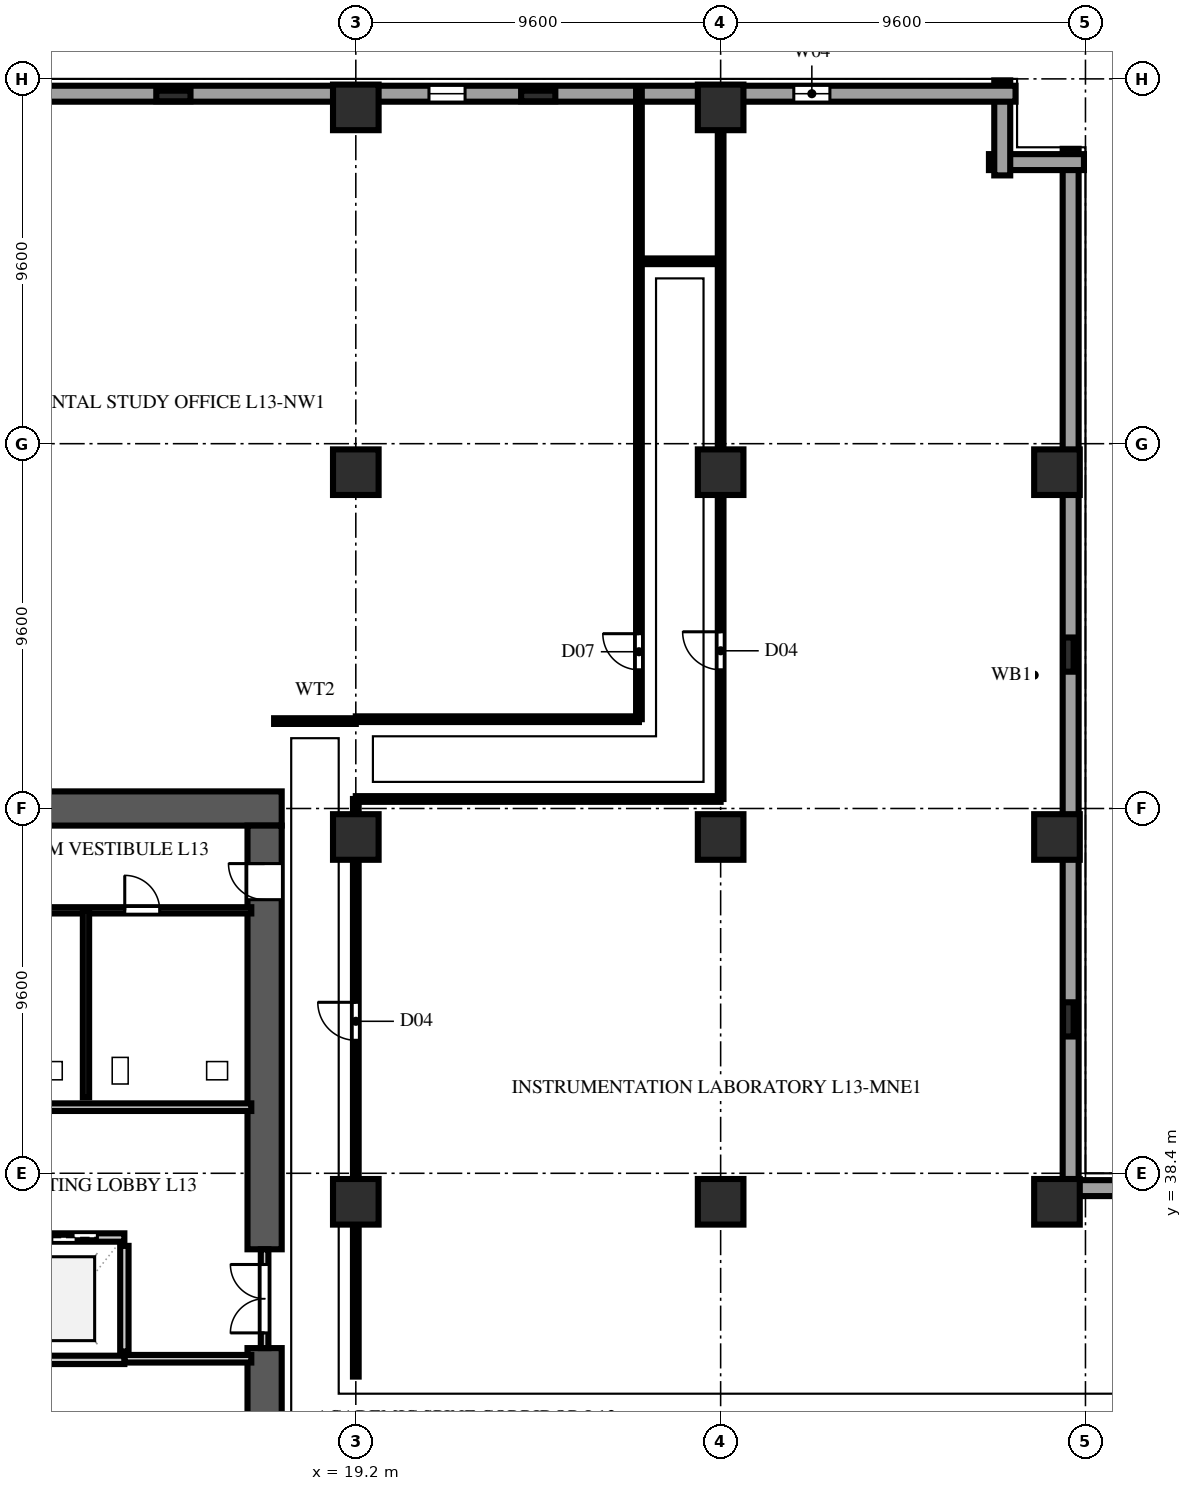
"""IFC4 building model, lengths in metres.
Left out: names, types, materials, properties, quantities, classifications, styles, units other than length and angle.
Written with IfcOpenShell. Run it as: python <this file> out.ifc"""

import sys

from ifc_helpers import new_model, si_unit, direction, frame, frame_2d, origin, origin_2d, place, context, subcontext, project, spatial, rectangle, extrude, element, fill, save


model = new_model("IFC4")
c1 = context("Model", 3, precision=1e-05, world=origin(), true_north=direction((0.0, 1.0)))
c2 = subcontext(c1, "Body", "Model", "MODEL_VIEW")
j1 = project(units=[si_unit("LENGTHUNIT", "METRE"), si_unit("PLANEANGLEUNIT", "RADIAN")], contexts=[c1])
p1 = place(None, origin())
s1 = spatial("IfcSite", under=j1, at=p1, CompositionType="ELEMENT")
p2 = place(p1, origin())
s2 = spatial("IfcBuilding", under=s1, at=p2, CompositionType="ELEMENT")
p3 = place(p2, frame((0.0, 0.0, 54.6)))
s3 = spatial("IfcBuildingStorey", under=s2, at=p3, CompositionType="ELEMENT", Elevation=54.6)
p4 = place(p3, frame((2.65, 48.0, 0.0), z_axis=(0.0, 0.0, 1.0), x_axis=(1.0, 0.0, 0.0)))
e1 = element("IfcWall", 1, at=p4, inside=s3, PredefinedType="SHEAR", context=c2, shape_type="SweptSolid", body=[
    extrude(rectangle(XDim=14.6, YDim=0.9, at=frame_2d((7.3, 0.0))), origin(), (0.0, 0.0, 1.0), 3.54),
])
p5 = place(p3, frame((16.8, 26.0, 0.0), z_axis=(0.0, 0.0, 1.0), x_axis=(0.0, 1.0, 0.0)))
e2 = element("IfcWall", 2, at=p5, inside=s3, PredefinedType="SHEAR", context=c2, shape_type="SweptSolid", body=[
    extrude(rectangle(XDim=7.8, YDim=0.9, at=frame_2d((3.9, 0.0))), origin(), (0.0, 0.0, 1.0), 3.54),
])
p6 = place(p3, frame((16.8, 36.4, 0.0), z_axis=(0.0, 0.0, 1.0), x_axis=(0.0, 1.0, 0.0)))
e3 = element("IfcWall", 3, at=p6, inside=s3, PredefinedType="SHEAR", context=c2, shape_type="SweptSolid", body=[
    extrude(rectangle(XDim=11.15, YDim=0.9, at=frame_2d((5.575, 0.0))), origin(), (0.0, 0.0, 1.0), 3.54),
])
p7 = place(p6, frame((9.2, 0.0, 0.0)))
e4 = element("IfcOpeningElement", 4, at=p7, cuts=e3, PredefinedType="OPENING", context=c2, shape_type="SweptSolid", body=[
    extrude(rectangle(XDim=0.95, YDim=2.15, at=frame_2d((0.475, 1.075))), frame((0.0, 0.462, 0.0), z_axis=(0.0, -1.0, 0.0), x_axis=(1.0, 0.0, 0.0)), (0.0, 0.0, 1.0), 0.924),
])
for number, where, z_axis, x_axis in (
    (5, (19.2, 37.65, 0.0), (0.0, 0.0, 1.0), (1.0, 0.0, 0.0)),
    (6, (19.2, 47.25, 0.0), (0.0, 0.0, 1.0), (1.0, 0.0, 0.0)),
    (7, (19.2, 56.85, 0.0), (0.0, 0.0, 1.0), (1.0, 0.0, 0.0)),
    (8, (19.2, 66.45, 0.0), (0.0, 0.0, 1.0), (1.0, 0.0, 0.0)),
    (9, (28.8, 37.65, 0.0), (0.0, 0.0, 1.0), (1.0, 0.0, 0.0)),
    (10, (28.8, 47.25, 0.0), (0.0, 0.0, 1.0), (1.0, 0.0, 0.0)),
    (11, (28.8, 56.85, 0.0), (0.0, 0.0, 1.0), (1.0, 0.0, 0.0)),
    (12, (28.8, 66.45, 0.0), (0.0, 0.0, 1.0), (1.0, 0.0, 0.0)),
    (13, (37.65, 37.65, 0.0), (0.0, 0.0, 1.0), (1.0, 0.0, 0.0)),
    (14, (37.65, 47.25, 0.0), (0.0, 0.0, 1.0), (1.0, 0.0, 0.0)),
    (15, (37.65, 56.85, 0.0), (0.0, 0.0, 1.0), (1.0, 0.0, 0.0)),
):
    element("IfcColumn", number, at=place(p3, frame(where, z_axis=z_axis, x_axis=x_axis)), inside=s3, PredefinedType="COLUMN", context=c2, shape_type="SweptSolid", body=[
        extrude(rectangle(XDim=1.2, YDim=1.2, at=origin_2d()), origin(), (0.0, 0.0, 1.0), 3.8),
    ])
for number, where, z_axis, x_axis in (
    (16, (14.4, 66.75, 0.0), (0.0, 0.0, 1.0), (1.0, 0.0, 0.0)),
    (17, (24.0, 66.75, 0.0), (0.0, 0.0, 1.0), (1.0, 0.0, 0.0)),
    (18, (37.95, 42.45, 0.0), (0.0, 0.0, 1.0), (0.0, 1.0, 0.0)),
    (19, (37.95, 52.05, 0.0), (0.0, 0.0, 1.0), (0.0, 1.0, 0.0)),
):
    element("IfcColumn", number, at=place(p3, frame(where, z_axis=z_axis, x_axis=x_axis)), inside=s3, PredefinedType="PILASTER", context=c2, shape_type="SweptSolid", body=[
        extrude(rectangle(XDim=0.9, YDim=0.28, at=origin_2d()), origin(), (0.0, 0.0, 1.0), 3.8),
    ])
for number, where, z_axis, x_axis in (
    (20, (65.36, 38.01, 0.0), (0.0, 0.0, 1.0), (-1.0, 0.0, 0.0)),
    (21, (38.01, 37.66, 0.0), (0.0, 0.0, 1.0), (0.0, 1.0, 0.0)),
):
    element("IfcWall", number, at=place(p3, frame(where, z_axis=z_axis, x_axis=x_axis)), inside=s3, PredefinedType="SOLIDWALL", context=c2, shape_type="SweptSolid", body=[
        extrude(rectangle(XDim=27.7, YDim=0.42, at=frame_2d((13.85, 0.0))), origin(), (0.0, 0.0, 1.0), 3.54),
    ])
for number, where, z_axis, x_axis in (
    (22, (38.36, 65.01, 0.0), (0.0, 0.0, 1.0), (-1.0, 0.0, 0.0)),
    (23, (36.21, 64.66, 0.0), (0.0, 0.0, 1.0), (0.0, 1.0, 0.0)),
):
    element("IfcWall", number, at=place(p3, frame(where, z_axis=z_axis, x_axis=x_axis)), inside=s3, PredefinedType="SOLIDWALL", context=c2, shape_type="SweptSolid", body=[
        extrude(rectangle(XDim=2.5, YDim=0.42, at=frame_2d((1.25, 0.0))), origin(), (0.0, 0.0, 1.0), 3.54),
    ])
p8 = place(p3, frame((36.56, 66.81, 0.0), z_axis=(0.0, 0.0, 1.0), x_axis=(-1.0, 0.0, 0.0)))
e24 = element("IfcWall", 24, at=p8, inside=s3, PredefinedType="SOLIDWALL", context=c2, shape_type="SweptSolid", body=[
    extrude(rectangle(XDim=34.72, YDim=0.42, at=frame_2d((17.36, 0.0))), origin(), (0.0, 0.0, 1.0), 3.54),
])
p9 = place(p8, frame((4.885, 0.0, 0.9)))
e25 = element("IfcOpeningElement", 25, at=p9, cuts=e24, PredefinedType="OPENING", context=c2, shape_type="SweptSolid", body=[
    extrude(rectangle(XDim=0.95, YDim=1.85, at=frame_2d((0.475, 0.925))), frame((0.0, 0.222, 0.0), z_axis=(0.0, -1.0, 0.0), x_axis=(1.0, 0.0, 0.0)), (0.0, 0.0, 1.0), 0.444),
])
p10 = place(p8, frame((14.485, 0.0, 0.9)))
e26 = element("IfcOpeningElement", 26, at=p10, cuts=e24, PredefinedType="OPENING", context=c2, shape_type="SweptSolid", body=[
    extrude(rectangle(XDim=0.95, YDim=1.85, at=frame_2d((0.475, 0.925))), frame((0.0, 0.222, 0.0), z_axis=(0.0, -1.0, 0.0), x_axis=(1.0, 0.0, 0.0)), (0.0, 0.0, 1.0), 0.444),
])
p11 = place(p3, frame((13.11, 33.71, 0.0), z_axis=(0.0, 0.0, 1.0), x_axis=(0.0, 1.0, 0.0)))
e27 = element("IfcWall", 27, at=p11, inside=s3, PredefinedType="SOLIDWALL", context=c2, shape_type="SweptSolid", body=[
    extrude(rectangle(XDim=2.78, YDim=0.22, at=frame_2d((1.39, 0.0))), origin(), (0.0, 0.0, 1.0), 3.54),
])
p12 = place(p3, frame((10.49, 33.49, 0.0), z_axis=(0.0, 0.0, 1.0), x_axis=(1.0, 0.0, 0.0)))
e28 = element("IfcWall", 28, at=p12, inside=s3, PredefinedType="SOLIDWALL", context=c2, shape_type="SweptSolid", body=[
    extrude(rectangle(XDim=2.62, YDim=0.22, at=frame_2d((1.31, 0.0))), origin(), (0.0, 0.0, 1.0), 3.54),
])
p13 = place(p3, frame((10.49, 36.71, 0.0), z_axis=(0.0, 0.0, 1.0), x_axis=(1.0, 0.0, 0.0)))
e29 = element("IfcWall", 29, at=p13, inside=s3, PredefinedType="SOLIDWALL", context=c2, shape_type="SweptSolid", body=[
    extrude(rectangle(XDim=2.62, YDim=0.22, at=frame_2d((1.31, 0.0))), origin(), (0.0, 0.0, 1.0), 3.54),
])
p14 = place(p13, frame((0.71, 0.0, 0.0)))
e30 = element("IfcOpeningElement", 30, at=p14, cuts=e29, PredefinedType="OPENING", context=c2, shape_type="SweptSolid", body=[
    extrude(rectangle(XDim=1.2, YDim=2.2, at=frame_2d((0.6, 1.1))), frame((0.0, 0.122, 0.0), z_axis=(0.0, -1.0, 0.0), x_axis=(1.0, 0.0, 0.0)), (0.0, 0.0, 1.0), 0.244),
])
p15 = place(p3, frame((13.12, 33.52, 0.0), z_axis=(0.0, 0.0, 1.0), x_axis=(1.0, 0.0, 0.0)))
e31 = element("IfcWall", 31, at=p15, inside=s3, PredefinedType="SOLIDWALL", context=c2, shape_type="SweptSolid", body=[
    extrude(rectangle(XDim=3.33, YDim=0.2, at=frame_2d((1.665, 0.0))), origin(), (0.0, 0.0, 1.0), 3.54),
])
p16 = place(p3, frame((6.32, 40.14, 0.0), z_axis=(0.0, 0.0, 1.0), x_axis=(1.0, 0.0, 0.0)))
e32 = element("IfcWall", 32, at=p16, inside=s3, PredefinedType="SOLIDWALL", context=c2, shape_type="SweptSolid", body=[
    extrude(rectangle(XDim=10.13, YDim=0.2, at=frame_2d((5.065, 0.0))), origin(), (0.0, 0.0, 1.0), 3.54),
])
p17 = place(p3, frame((16.8, 33.8, 0.0), z_axis=(0.0, 0.0, 1.0), x_axis=(0.0, 1.0, 0.0)))
e33 = element("IfcWall", 33, at=p17, inside=s3, PredefinedType="SOLIDWALL", context=c2, shape_type="SweptSolid", body=[
    extrude(rectangle(XDim=2.6, YDim=0.2, at=frame_2d((1.3, 0.0))), origin(), (0.0, 0.0, 1.0), 3.54),
])
p18 = place(p17, frame((0.4, 0.0, 0.0)))
e34 = element("IfcOpeningElement", 34, at=p18, cuts=e33, PredefinedType="OPENING", context=c2, shape_type="SweptSolid", body=[
    extrude(rectangle(XDim=1.8, YDim=2.2, at=frame_2d((0.9, 1.1))), frame((0.0, 0.112, 0.0), z_axis=(0.0, -1.0, 0.0), x_axis=(1.0, 0.0, 0.0)), (0.0, 0.0, 1.0), 0.224),
])
p19 = place(p3, frame((6.32, 45.32, 0.0), z_axis=(0.0, 0.0, 1.0), x_axis=(1.0, 0.0, 0.0)))
e35 = element("IfcWall", 35, at=p19, inside=s3, PredefinedType="PLUMBINGWALL", context=c2, shape_type="SweptSolid", body=[
    extrude(rectangle(XDim=10.13, YDim=0.165, at=frame_2d((5.065, 0.0))), origin(), (0.0, 0.0, 1.0), 3.54),
])
p20 = place(p19, frame((0.55, 0.0, 0.0)))
e36 = element("IfcOpeningElement", 36, at=p20, cuts=e35, PredefinedType="OPENING", context=c2, shape_type="SweptSolid", body=[
    extrude(rectangle(XDim=0.85, YDim=2.1, at=frame_2d((0.425, 1.05))), frame((0.0, 0.094, 0.0), z_axis=(0.0, -1.0, 0.0), x_axis=(1.0, 0.0, 0.0)), (0.0, 0.0, 1.0), 0.189),
])
p21 = place(p19, frame((3.1, 0.0, 0.0)))
e37 = element("IfcOpeningElement", 37, at=p21, cuts=e35, PredefinedType="OPENING", context=c2, shape_type="SweptSolid", body=[
    extrude(rectangle(XDim=0.92, YDim=2.15, at=frame_2d((0.46, 1.075))), frame((0.0, 0.094, 0.0), z_axis=(0.0, -1.0, 0.0), x_axis=(1.0, 0.0, 0.0)), (0.0, 0.0, 1.0), 0.189),
])
p22 = place(p19, frame((6.8, 0.0, 0.0)))
e38 = element("IfcOpeningElement", 38, at=p22, cuts=e35, PredefinedType="OPENING", context=c2, shape_type="SweptSolid", body=[
    extrude(rectangle(XDim=0.92, YDim=2.15, at=frame_2d((0.46, 1.075))), frame((0.0, 0.094, 0.0), z_axis=(0.0, -1.0, 0.0), x_axis=(1.0, 0.0, 0.0)), (0.0, 0.0, 1.0), 0.189),
])
p23 = place(p3, frame((12.1, 40.4, 0.0), z_axis=(0.0, 0.0, 1.0), x_axis=(0.0, 1.0, 0.0)))
e39 = element("IfcWall", 39, at=p23, inside=s3, PredefinedType="PLUMBINGWALL", context=c2, shape_type="SweptSolid", body=[
    extrude(rectangle(XDim=4.92, YDim=0.165, at=frame_2d((2.46, 0.0))), origin(), (0.0, 0.0, 1.0), 3.54),
])
p24 = place(p3, frame((17.05, 50.3, 0.0), z_axis=(0.0, 0.0, 1.0), x_axis=(1.0, 0.0, 0.0)))
e40 = element("IfcWall", 40, at=p24, inside=s3, PredefinedType="PARTITIONING", context=c2, shape_type="SweptSolid", body=[
    extrude(rectangle(XDim=2.15, YDim=0.15, at=frame_2d((1.075, 0.0))), origin(), (0.0, 0.0, 1.0), 3.54),
])
p25 = place(p3, frame((19.2, 33.05, 0.0), z_axis=(0.0, 0.0, 1.0), x_axis=(0.0, 1.0, 0.0)))
e41 = element("IfcWall", 41, at=p25, inside=s3, PredefinedType="PARTITIONING", context=c2, shape_type="SweptSolid", body=[
    extrude(rectangle(XDim=15.2, YDim=0.15, at=frame_2d((7.6, 0.0))), origin(), (0.0, 0.0, 1.0), 3.232),
])
p26 = place(p25, frame((8.85, 0.0, 0.0)))
e42 = element("IfcOpeningElement", 42, at=p26, cuts=e41, PredefinedType="OPENING", context=c2, shape_type="SweptSolid", body=[
    extrude(rectangle(XDim=1.0, YDim=2.2, at=frame_2d((0.5, 1.1))), frame((0.0, 0.087, 0.0), z_axis=(0.0, -1.0, 0.0), x_axis=(1.0, 0.0, 0.0)), (0.0, 0.0, 1.0), 0.174),
])
p27 = place(p3, frame((19.2, 48.25, 0.0), z_axis=(0.0, 0.0, 1.0), x_axis=(1.0, 0.0, 0.0)))
e43 = element("IfcWall", 43, at=p27, inside=s3, PredefinedType="PARTITIONING", context=c2, shape_type="SweptSolid", body=[
    extrude(rectangle(XDim=9.6, YDim=0.15, at=frame_2d((4.8, 0.0))), origin(), (0.0, 0.0, 1.0), 3.54),
])
p28 = place(p3, frame((19.2, 50.35, 0.0), z_axis=(0.0, 0.0, 1.0), x_axis=(1.0, 0.0, 0.0)))
e44 = element("IfcWall", 44, at=p28, inside=s3, PredefinedType="PARTITIONING", context=c2, shape_type="SweptSolid", body=[
    extrude(rectangle(XDim=7.45, YDim=0.15, at=frame_2d((3.725, 0.0))), origin(), (0.0, 0.0, 1.0), 3.54),
])
p29 = place(p3, frame((26.65, 62.4, 0.0), z_axis=(0.0, 0.0, 1.0), x_axis=(1.0, 0.0, 0.0)))
e45 = element("IfcWall", 45, at=p29, inside=s3, PredefinedType="PARTITIONING", context=c2, shape_type="SweptSolid", body=[
    extrude(rectangle(XDim=2.15, YDim=0.15, at=frame_2d((1.075, 0.0))), origin(), (0.0, 0.0, 1.0), 3.54),
])
p30 = place(p3, frame((28.8, 48.25, 0.0), z_axis=(0.0, 0.0, 1.0), x_axis=(0.0, 1.0, 0.0)))
e46 = element("IfcWall", 46, at=p30, inside=s3, PredefinedType="PARTITIONING", context=c2, shape_type="SweptSolid", body=[
    extrude(rectangle(XDim=18.2, YDim=0.15, at=frame_2d((9.1, 0.0))), origin(), (0.0, 0.0, 1.0), 3.232),
])
p31 = place(p30, frame((3.4, 0.0, 0.0)))
e47 = element("IfcOpeningElement", 47, at=p31, cuts=e46, PredefinedType="OPENING", context=c2, shape_type="SweptSolid", body=[
    extrude(rectangle(XDim=1.0, YDim=2.2, at=frame_2d((0.5, 1.1))), frame((0.0, 0.087, 0.0), z_axis=(0.0, -1.0, 0.0), x_axis=(1.0, 0.0, 0.0)), (0.0, 0.0, 1.0), 0.174),
])
p32 = place(p3, frame((28.8, 66.45, 0.0), z_axis=(0.0, 0.0, 1.0), x_axis=(0.0, 1.0, 0.0)))
e48 = element("IfcWall", 48, at=p32, inside=s3, PredefinedType="PARTITIONING", context=c2, shape_type="SweptSolid", body=[
    extrude(rectangle(XDim=0.53, YDim=0.15, at=frame_2d((0.265, 0.0))), origin(), (0.0, 0.0, 1.0), 3.54),
])
p33 = place(p3, frame((26.65, 50.35, 0.0), z_axis=(0.0, 0.0, 1.0), x_axis=(0.0, 1.0, 0.0)))
e49 = element("IfcWall", 49, at=p33, inside=s3, PredefinedType="PARTITIONING", context=c2, shape_type="SweptSolid", body=[
    extrude(rectangle(XDim=16.63, YDim=0.15, at=frame_2d((8.315, 0.0))), origin(), (0.0, 0.0, 1.0), 3.54),
])
p34 = place(p33, frame((1.3, 0.0, 0.0)))
e50 = element("IfcOpeningElement", 50, at=p34, cuts=e49, PredefinedType="OPENING", context=c2, shape_type="SweptSolid", body=[
    extrude(rectangle(XDim=0.95, YDim=2.15, at=frame_2d((0.475, 1.075))), frame((0.0, 0.087, 0.0), z_axis=(0.0, -1.0, 0.0), x_axis=(1.0, 0.0, 0.0)), (0.0, 0.0, 1.0), 0.174),
])
p35 = place(p9, origin())
e51 = element("IfcWindow", 51, at=p35, inside=s3, PartitioningType="SINGLE_PANEL", PredefinedType="WINDOW", context=c2, shape_type="SweptSolid", body=[
    extrude(rectangle(XDim=0.95, YDim=1.85, at=frame_2d((0.475, 0.925))), frame((0.0, 0.11, 0.0), z_axis=(0.0, -1.0, 0.0), x_axis=(1.0, 0.0, 0.0)), (0.0, 0.0, 1.0), 0.06),
])
fill(e25, e51)
p36 = place(p10, origin())
e52 = element("IfcWindow", 52, at=p36, inside=s3, PartitioningType="SINGLE_PANEL", PredefinedType="WINDOW", context=c2, shape_type="SweptSolid", body=[
    extrude(rectangle(XDim=0.95, YDim=1.85, at=frame_2d((0.475, 0.925))), frame((0.0, 0.11, 0.0), z_axis=(0.0, -1.0, 0.0), x_axis=(1.0, 0.0, 0.0)), (0.0, 0.0, 1.0), 0.06),
])
fill(e26, e52)
p37 = place(p14, origin())
e53 = element("IfcDoor", 53, at=p37, inside=s3, OperationType="DOUBLE_DOOR_SLIDING", PredefinedType="DOOR", context=c2, shape_type="SweptSolid", body=[
    extrude(rectangle(XDim=1.2, YDim=2.2, at=frame_2d((0.6, 1.1))), frame((0.0, 0.025, 0.0), z_axis=(0.0, -1.0, 0.0), x_axis=(1.0, 0.0, 0.0)), (0.0, 0.0, 1.0), 0.05),
])
fill(e30, e53)
p38 = place(p7, origin())
e54 = element("IfcDoor", 54, at=p38, inside=s3, OperationType="SINGLE_SWING_RIGHT", PredefinedType="DOOR", context=c2, shape_type="SweptSolid", body=[
    extrude(rectangle(XDim=0.95, YDim=2.15, at=frame_2d((0.475, 1.075))), frame((0.0, 0.025, 0.0), z_axis=(0.0, -1.0, 0.0), x_axis=(1.0, 0.0, 0.0)), (0.0, 0.0, 1.0), 0.05),
])
fill(e4, e54)
p39 = place(p18, origin())
e55 = element("IfcDoor", 55, at=p39, inside=s3, OperationType="DOUBLE_DOOR_SINGLE_SWING", PredefinedType="DOOR", context=c2, shape_type="SweptSolid", body=[
    extrude(rectangle(XDim=1.8, YDim=2.2, at=frame_2d((0.9, 1.1))), frame((0.0, 0.025, 0.0), z_axis=(0.0, -1.0, 0.0), x_axis=(1.0, 0.0, 0.0)), (0.0, 0.0, 1.0), 0.05),
])
fill(e34, e55)
p40 = place(p22, origin())
e56 = element("IfcDoor", 56, at=p40, inside=s3, OperationType="SINGLE_SWING_LEFT", PredefinedType="DOOR", context=c2, shape_type="SweptSolid", body=[
    extrude(rectangle(XDim=0.92, YDim=2.15, at=frame_2d((0.46, 1.075))), frame((0.0, 0.025, 0.0), z_axis=(0.0, -1.0, 0.0), x_axis=(1.0, 0.0, 0.0)), (0.0, 0.0, 1.0), 0.05),
])
fill(e38, e56)
p41 = place(p26, origin())
e57 = element("IfcDoor", 57, at=p41, inside=s3, OperationType="SINGLE_SWING_RIGHT", PredefinedType="DOOR", context=c2, shape_type="SweptSolid", body=[
    extrude(rectangle(XDim=1.0, YDim=2.2, at=frame_2d((0.5, 1.1))), frame((0.0, 0.025, 0.0), z_axis=(0.0, -1.0, 0.0), x_axis=(1.0, 0.0, 0.0)), (0.0, 0.0, 1.0), 0.05),
])
fill(e42, e57)
p42 = place(p31, origin())
e58 = element("IfcDoor", 58, at=p42, inside=s3, OperationType="SINGLE_SWING_RIGHT", PredefinedType="DOOR", context=c2, shape_type="SweptSolid", body=[
    extrude(rectangle(XDim=1.0, YDim=2.2, at=frame_2d((0.5, 1.1))), frame((0.0, 0.025, 0.0), z_axis=(0.0, -1.0, 0.0), x_axis=(1.0, 0.0, 0.0)), (0.0, 0.0, 1.0), 0.05),
])
fill(e47, e58)
p43 = place(p34, origin())
e59 = element("IfcDoor", 59, at=p43, inside=s3, OperationType="SINGLE_SWING_RIGHT", PredefinedType="DOOR", context=c2, shape_type="SweptSolid", body=[
    extrude(rectangle(XDim=0.95, YDim=2.15, at=frame_2d((0.475, 1.075))), frame((0.0, 0.025, 0.0), z_axis=(0.0, -1.0, 0.0), x_axis=(1.0, 0.0, 0.0)), (0.0, 0.0, 1.0), 0.05),
])
fill(e50, e59)
save(model, sys.argv[1])
